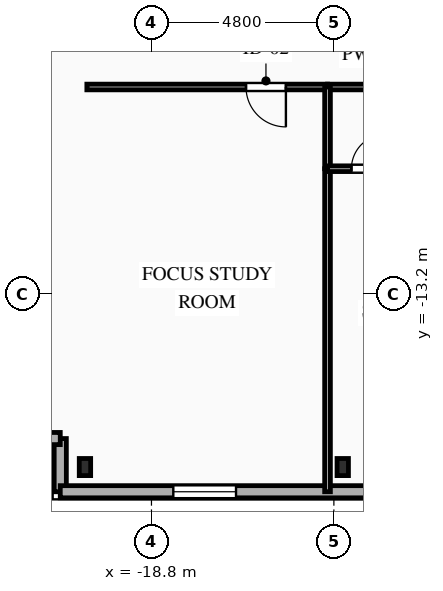
"""IFC4 building model, lengths in metres.
Left out: names, types, materials, properties, quantities, classifications, styles, units other than length and angle.
Written with IfcOpenShell. Run it as: python <this file> out.ifc"""

import sys

from ifc_helpers import new_model, si_unit, direction, frame, frame_2d, origin, origin_2d, place, context, subcontext, project, spatial, rectangle, i_section, extrude, element, fill, save


model = new_model("IFC4")
c1 = context("Model", 3, precision=1e-05, world=origin(), true_north=direction((0.0, 1.0)))
c2 = subcontext(c1, "Body", "Model", "MODEL_VIEW")
j1 = project(units=[si_unit("LENGTHUNIT", "METRE"), si_unit("PLANEANGLEUNIT", "RADIAN")], contexts=[c1])
p1 = place(None, origin())
s1 = spatial("IfcSite", under=j1, at=p1, CompositionType="ELEMENT")
p2 = place(p1, origin())
s2 = spatial("IfcBuilding", under=s1, at=p2, CompositionType="ELEMENT")
p3 = place(p2, frame((0.0, 0.0, 241.7)))
s3 = spatial("IfcBuildingStorey", under=s2, at=p3, CompositionType="ELEMENT", Elevation=241.7)
for number, where, z_axis, x_axis in (
    (1, (-20.55, -17.75, 0.0), (0.0, 0.0, 1.0), (1.0, 0.0, 0.0)),
    (2, (-13.767, -17.75, 0.0), (0.0, 0.0, 1.0), (1.0, 0.0, 0.0)),
):
    element("IfcColumn", number, at=place(p3, frame(where, z_axis=z_axis, x_axis=x_axis)), inside=s3, PredefinedType="COLUMN", context=c2, shape_type="SweptSolid", body=[
        extrude(i_section(OverallWidth=0.3, OverallDepth=0.45, WebThickness=0.014, FlangeThickness=0.026, FilletRadius=0.027, at=origin_2d()), origin(), (0.0, 0.0, 1.0), 3.35),
    ])
p4 = place(p3, frame((-21.2, -18.4, 0.0), z_axis=(0.0, 0.0, 1.0), x_axis=(0.0, 1.0, 0.0)))
e3 = element("IfcWall", 3, at=p4, inside=s3, PredefinedType="SOLIDWALL", context=c2, shape_type="SweptSolid", body=[
    extrude(rectangle(XDim=1.4, YDim=0.32, at=frame_2d((0.7, 0.0))), origin(), (0.0, 0.0, 1.0), 3.04),
])
p5 = place(p3, frame((-21.2, -17.0, 0.0), z_axis=(0.0, 0.0, 1.0), x_axis=(-1.0, 0.0, 0.0)))
e4 = element("IfcWall", 4, at=p5, inside=s3, PredefinedType="SOLIDWALL", context=c2, shape_type="SweptSolid", body=[
    extrude(rectangle(XDim=1.4, YDim=0.32, at=frame_2d((0.7, 0.0))), origin(), (0.0, 0.0, 1.0), 3.04),
])
p6 = place(p3, frame((20.8, -18.4, 0.0), z_axis=(0.0, 0.0, 1.0), x_axis=(-1.0, 0.0, 0.0)))
e5 = element("IfcWall", 5, at=p6, inside=s3, PredefinedType="SOLIDWALL", context=c2, shape_type="SweptSolid", body=[
    extrude(rectangle(XDim=42.0, YDim=0.32, at=frame_2d((21.0, 0.0))), origin(), (0.0, 0.0, 1.0), 3.04),
])
p7 = place(p6, frame((3.255, 0.0, 0.85)))
e6 = element("IfcOpeningElement", 6, at=p7, cuts=e5, PredefinedType="OPENING", context=c2, shape_type="SweptSolid", body=[
    extrude(rectangle(XDim=1.65, YDim=1.85, at=frame_2d((0.825, 0.925))), frame((0.0, 0.17, 0.0), z_axis=(0.0, -1.0, 0.0), x_axis=(1.0, 0.0, 0.0)), (0.0, 0.0, 1.0), 0.34),
])
p8 = place(p6, frame((9.98, 0.0, 0.85)))
e7 = element("IfcOpeningElement", 7, at=p8, cuts=e5, PredefinedType="OPENING", context=c2, shape_type="SweptSolid", body=[
    extrude(rectangle(XDim=2.2, YDim=1.85, at=frame_2d((1.1, 0.925))), frame((0.0, 0.17, 0.0), z_axis=(0.0, -1.0, 0.0), x_axis=(1.0, 0.0, 0.0)), (0.0, 0.0, 1.0), 0.34),
])
p9 = place(p6, frame((16.82, 0.0, 0.85)))
e8 = element("IfcOpeningElement", 8, at=p9, cuts=e5, PredefinedType="OPENING", context=c2, shape_type="SweptSolid", body=[
    extrude(rectangle(XDim=2.2, YDim=1.85, at=frame_2d((1.1, 0.925))), frame((0.0, 0.17, 0.0), z_axis=(0.0, -1.0, 0.0), x_axis=(1.0, 0.0, 0.0)), (0.0, 0.0, 1.0), 0.34),
])
p10 = place(p6, frame((23.66, 0.0, 0.85)))
e9 = element("IfcOpeningElement", 9, at=p10, cuts=e5, PredefinedType="OPENING", context=c2, shape_type="SweptSolid", body=[
    extrude(rectangle(XDim=2.2, YDim=1.85, at=frame_2d((1.1, 0.925))), frame((0.0, 0.17, 0.0), z_axis=(0.0, -1.0, 0.0), x_axis=(1.0, 0.0, 0.0)), (0.0, 0.0, 1.0), 0.34),
])
p11 = place(p6, frame((30.5, 0.0, 0.85)))
e10 = element("IfcOpeningElement", 10, at=p11, cuts=e5, PredefinedType="OPENING", context=c2, shape_type="SweptSolid", body=[
    extrude(rectangle(XDim=2.2, YDim=1.85, at=frame_2d((1.1, 0.925))), frame((0.0, 0.17, 0.0), z_axis=(0.0, -1.0, 0.0), x_axis=(1.0, 0.0, 0.0)), (0.0, 0.0, 1.0), 0.34),
])
p12 = place(p6, frame((37.375, 0.0, 0.85)))
e11 = element("IfcOpeningElement", 11, at=p12, cuts=e5, PredefinedType="OPENING", context=c2, shape_type="SweptSolid", body=[
    extrude(rectangle(XDim=1.65, YDim=1.85, at=frame_2d((0.825, 0.925))), frame((0.0, 0.17, 0.0), z_axis=(0.0, -1.0, 0.0), x_axis=(1.0, 0.0, 0.0)), (0.0, 0.0, 1.0), 0.34),
])
p13 = place(p3, frame((-14.167, -7.75, 0.0), z_axis=(0.0, 0.0, 1.0), x_axis=(-1.0, 0.0, 0.0)))
e12 = element("IfcWall", 12, at=p13, inside=s3, PredefinedType="PARTITIONING", context=c2, shape_type="SweptSolid", body=[
    extrude(rectangle(XDim=6.333, YDim=0.15, at=frame_2d((3.167, 0.0))), origin(), (0.0, 0.0, 1.0), 3.04),
])
p14 = place(p13, frame((1.095, 0.0, 0.0)))
e13 = element("IfcOpeningElement", 13, at=p14, cuts=e12, PredefinedType="OPENING", context=c2, shape_type="SweptSolid", body=[
    extrude(rectangle(XDim=1.05, YDim=2.15, at=frame_2d((0.525, 1.075))), frame((0.0, 0.085, 0.0), z_axis=(0.0, -1.0, 0.0), x_axis=(1.0, 0.0, 0.0)), (0.0, 0.0, 1.0), 0.17),
])
p15 = place(p3, frame((-11.717, -7.75, 0.0), z_axis=(0.0, 0.0, 1.0), x_axis=(-1.0, 0.0, 0.0)))
e14 = element("IfcWall", 14, at=p15, inside=s3, PredefinedType="PLUMBINGWALL", context=c2, shape_type="SweptSolid", body=[
    extrude(rectangle(XDim=2.45, YDim=0.15, at=frame_2d((1.225, 0.0))), origin(), (0.0, 0.0, 1.0), 3.04),
])
p16 = place(p3, frame((-14.167, -9.9, 0.0), z_axis=(0.0, 0.0, 1.0), x_axis=(0.0, -1.0, 0.0)))
e15 = element("IfcWall", 15, at=p16, inside=s3, PredefinedType="PARTITIONING", context=c2, shape_type="SweptSolid", body=[
    extrude(rectangle(XDim=8.5, YDim=0.15, at=frame_2d((4.25, 0.0))), origin(), (0.0, 0.0, 1.0), 3.04),
])
p17 = place(p3, frame((-14.167, -7.75, 0.0), z_axis=(0.0, 0.0, 1.0), x_axis=(0.0, -1.0, 0.0)))
e16 = element("IfcWall", 16, at=p17, inside=s3, PredefinedType="PLUMBINGWALL", context=c2, shape_type="SweptSolid", body=[
    extrude(rectangle(XDim=2.15, YDim=0.15, at=frame_2d((1.075, 0.0))), origin(), (0.0, 0.0, 1.0), 3.04),
])
p18 = place(p3, frame((-14.167, -9.9, 0.0), z_axis=(0.0, 0.0, 1.0), x_axis=(1.0, 0.0, 0.0)))
e17 = element("IfcWall", 17, at=p18, inside=s3, PredefinedType="PLUMBINGWALL", context=c2, shape_type="SweptSolid", body=[
    extrude(rectangle(XDim=2.45, YDim=0.15, at=frame_2d((1.225, 0.0))), origin(), (0.0, 0.0, 1.0), 3.04),
])
p19 = place(p18, frame((0.629, 0.0, 0.0)))
e18 = element("IfcOpeningElement", 18, at=p19, cuts=e17, PredefinedType="OPENING", context=c2, shape_type="SweptSolid", body=[
    extrude(rectangle(XDim=0.9, YDim=2.1, at=frame_2d((0.45, 1.05))), frame((0.0, 0.085, 0.0), z_axis=(0.0, -1.0, 0.0), x_axis=(1.0, 0.0, 0.0)), (0.0, 0.0, 1.0), 0.17),
])
p20 = place(p12, origin())
e19 = element("IfcWindow", 19, at=p20, inside=s3, PartitioningType="SINGLE_PANEL", PredefinedType="WINDOW", context=c2, shape_type="SweptSolid", body=[
    extrude(rectangle(XDim=1.65, YDim=1.85, at=frame_2d((0.825, 0.925))), frame((0.0, 0.03, 0.0), z_axis=(0.0, -1.0, 0.0), x_axis=(1.0, 0.0, 0.0)), (0.0, 0.0, 1.0), 0.06),
])
fill(e11, e19)
p21 = place(p14, origin())
e20 = element("IfcDoor", 20, at=p21, inside=s3, OperationType="SINGLE_SWING_LEFT", PredefinedType="DOOR", context=c2, shape_type="SweptSolid", body=[
    extrude(rectangle(XDim=1.05, YDim=2.15, at=frame_2d((0.525, 1.075))), frame((0.0, 0.025, 0.0), z_axis=(0.0, -1.0, 0.0), x_axis=(1.0, 0.0, 0.0)), (0.0, 0.0, 1.0), 0.05),
])
fill(e13, e20)
p22 = place(p19, origin())
e21 = element("IfcDoor", 21, at=p22, inside=s3, OperationType="SINGLE_SWING_RIGHT", PredefinedType="DOOR", context=c2, shape_type="SweptSolid", body=[
    extrude(rectangle(XDim=0.9, YDim=2.1, at=frame_2d((0.45, 1.05))), frame((0.0, 0.025, 0.0), z_axis=(0.0, -1.0, 0.0), x_axis=(1.0, 0.0, 0.0)), (0.0, 0.0, 1.0), 0.05),
])
fill(e18, e21)
save(model, sys.argv[1])
